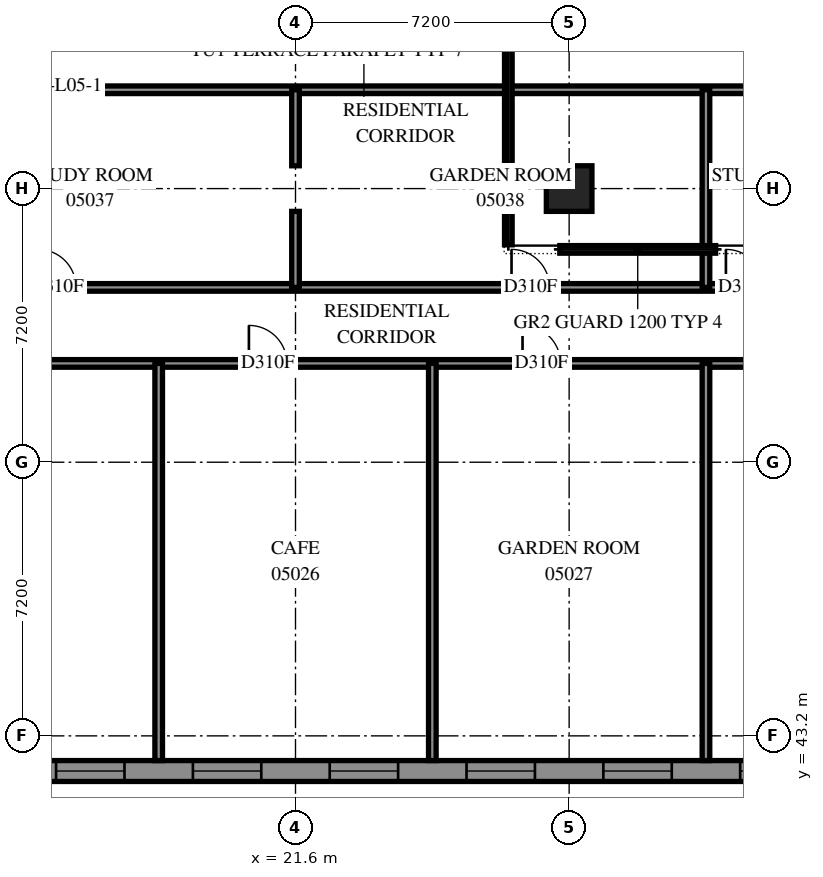
"""IFC4 building model, lengths in metres.
Left out: names, types, materials, properties, quantities, classifications, styles, units other than length and angle.
Written with IfcOpenShell. Run it as: python <this file> out.ifc"""

import sys

from ifc_helpers import new_model, si_unit, direction, frame, frame_2d, origin, origin_2d, place, context, subcontext, project, spatial, polyline, rectangle, outline, extrude, element, fill, save


model = new_model("IFC4")
c1 = context("Model", 3, precision=1e-05, world=origin(), true_north=direction((0.0, 1.0)))
c2 = subcontext(c1, "Body", "Model", "MODEL_VIEW")
j1 = project(units=[si_unit("LENGTHUNIT", "METRE"), si_unit("PLANEANGLEUNIT", "RADIAN")], contexts=[c1])
p1 = place(None, origin())
s1 = spatial("IfcSite", under=j1, at=p1, CompositionType="ELEMENT")
p2 = place(p1, origin())
s2 = spatial("IfcBuilding", under=s1, at=p2, CompositionType="ELEMENT")
p3 = place(p2, frame((0.0, 0.0, 22.8)))
s3 = spatial("IfcBuildingStorey", under=s2, at=p3, CompositionType="ELEMENT", Elevation=22.8)
p4 = place(p3, frame((28.8, 57.6, 0.0), z_axis=(0.0, 0.0, 1.0), x_axis=(1.0, 0.0, 0.0)))
e1 = element("IfcColumn", 1, at=p4, inside=s3, PredefinedType="COLUMN", context=c2, shape_type="SweptSolid", body=[
    extrude(rectangle(XDim=1.2, YDim=1.2, at=origin_2d()), origin(), (0.0, 0.0, 1.0), 3.9),
])
p5 = place(p3, frame((0.275, 42.275, 0.0), z_axis=(0.0, 0.0, 1.0), x_axis=(1.0, 0.0, 0.0)))
e2 = element("IfcWall", 2, at=p5, inside=s3, PredefinedType="SOLIDWALL", context=c2, shape_type="SweptSolid", body=[
    extrude(outline(polyline([(-0.275, -0.275), (76.681, -0.275), (76.909, 0.275), (0.275, 0.275), (-0.275, -0.275)])), origin(), (0.0, 0.0, 1.0), 3.9),
])
p6 = place(p5, frame((1.0, 0.0, 0.7)))
e3 = element("IfcOpeningElement", 3, at=p6, cuts=e2, PredefinedType="OPENING", context=c2, shape_type="SweptSolid", body=[
    extrude(rectangle(XDim=1.8, YDim=2.4, at=frame_2d((0.9, 1.2))), frame((0.0, 0.285, 0.0), z_axis=(0.0, -1.0, 0.0), x_axis=(1.0, 0.0, 0.0)), (0.0, 0.0, 1.0), 0.57),
])
p7 = place(p5, frame((3.825, 0.0, 0.7)))
e4 = element("IfcOpeningElement", 4, at=p7, cuts=e2, PredefinedType="OPENING", context=c2, shape_type="SweptSolid", body=[
    extrude(rectangle(XDim=1.8, YDim=2.4, at=frame_2d((0.9, 1.2))), frame((0.0, 0.285, 0.0), z_axis=(0.0, -1.0, 0.0), x_axis=(1.0, 0.0, 0.0)), (0.0, 0.0, 1.0), 0.57),
])
p8 = place(p5, frame((7.825, 0.0, 0.7)))
e5 = element("IfcOpeningElement", 5, at=p8, cuts=e2, PredefinedType="OPENING", context=c2, shape_type="SweptSolid", body=[
    extrude(rectangle(XDim=1.8, YDim=2.4, at=frame_2d((0.9, 1.2))), frame((0.0, 0.285, 0.0), z_axis=(0.0, -1.0, 0.0), x_axis=(1.0, 0.0, 0.0)), (0.0, 0.0, 1.0), 0.57),
])
p9 = place(p5, frame((11.425, 0.0, 0.7)))
e6 = element("IfcOpeningElement", 6, at=p9, cuts=e2, PredefinedType="OPENING", context=c2, shape_type="SweptSolid", body=[
    extrude(rectangle(XDim=1.8, YDim=2.4, at=frame_2d((0.9, 1.2))), frame((0.0, 0.285, 0.0), z_axis=(0.0, -1.0, 0.0), x_axis=(1.0, 0.0, 0.0)), (0.0, 0.0, 1.0), 0.57),
])
p10 = place(p5, frame((15.025, 0.0, 0.7)))
e7 = element("IfcOpeningElement", 7, at=p10, cuts=e2, PredefinedType="OPENING", context=c2, shape_type="SweptSolid", body=[
    extrude(rectangle(XDim=1.8, YDim=2.4, at=frame_2d((0.9, 1.2))), frame((0.0, 0.285, 0.0), z_axis=(0.0, -1.0, 0.0), x_axis=(1.0, 0.0, 0.0)), (0.0, 0.0, 1.0), 0.57),
])
p11 = place(p5, frame((18.625, 0.0, 0.7)))
e8 = element("IfcOpeningElement", 8, at=p11, cuts=e2, PredefinedType="OPENING", context=c2, shape_type="SweptSolid", body=[
    extrude(rectangle(XDim=1.8, YDim=2.4, at=frame_2d((0.9, 1.2))), frame((0.0, 0.285, 0.0), z_axis=(0.0, -1.0, 0.0), x_axis=(1.0, 0.0, 0.0)), (0.0, 0.0, 1.0), 0.57),
])
p12 = place(p5, frame((22.225, 0.0, 0.7)))
e9 = element("IfcOpeningElement", 9, at=p12, cuts=e2, PredefinedType="OPENING", context=c2, shape_type="SweptSolid", body=[
    extrude(rectangle(XDim=1.8, YDim=2.4, at=frame_2d((0.9, 1.2))), frame((0.0, 0.285, 0.0), z_axis=(0.0, -1.0, 0.0), x_axis=(1.0, 0.0, 0.0)), (0.0, 0.0, 1.0), 0.57),
])
p13 = place(p5, frame((25.825, 0.0, 0.7)))
e10 = element("IfcOpeningElement", 10, at=p13, cuts=e2, PredefinedType="OPENING", context=c2, shape_type="SweptSolid", body=[
    extrude(rectangle(XDim=1.8, YDim=2.4, at=frame_2d((0.9, 1.2))), frame((0.0, 0.285, 0.0), z_axis=(0.0, -1.0, 0.0), x_axis=(1.0, 0.0, 0.0)), (0.0, 0.0, 1.0), 0.57),
])
p14 = place(p5, frame((29.425, 0.0, 0.7)))
e11 = element("IfcOpeningElement", 11, at=p14, cuts=e2, PredefinedType="OPENING", context=c2, shape_type="SweptSolid", body=[
    extrude(rectangle(XDim=1.8, YDim=2.4, at=frame_2d((0.9, 1.2))), frame((0.0, 0.285, 0.0), z_axis=(0.0, -1.0, 0.0), x_axis=(1.0, 0.0, 0.0)), (0.0, 0.0, 1.0), 0.57),
])
p15 = place(p5, frame((33.025, 0.0, 0.7)))
e12 = element("IfcOpeningElement", 12, at=p15, cuts=e2, PredefinedType="OPENING", context=c2, shape_type="SweptSolid", body=[
    extrude(rectangle(XDim=1.8, YDim=2.4, at=frame_2d((0.9, 1.2))), frame((0.0, 0.285, 0.0), z_axis=(0.0, -1.0, 0.0), x_axis=(1.0, 0.0, 0.0)), (0.0, 0.0, 1.0), 0.57),
])
p16 = place(p5, frame((36.625, 0.0, 0.7)))
e13 = element("IfcOpeningElement", 13, at=p16, cuts=e2, PredefinedType="OPENING", context=c2, shape_type="SweptSolid", body=[
    extrude(rectangle(XDim=1.8, YDim=2.4, at=frame_2d((0.9, 1.2))), frame((0.0, 0.285, 0.0), z_axis=(0.0, -1.0, 0.0), x_axis=(1.0, 0.0, 0.0)), (0.0, 0.0, 1.0), 0.57),
])
p17 = place(p5, frame((40.225, 0.0, 0.7)))
e14 = element("IfcOpeningElement", 14, at=p17, cuts=e2, PredefinedType="OPENING", context=c2, shape_type="SweptSolid", body=[
    extrude(rectangle(XDim=1.8, YDim=2.4, at=frame_2d((0.9, 1.2))), frame((0.0, 0.285, 0.0), z_axis=(0.0, -1.0, 0.0), x_axis=(1.0, 0.0, 0.0)), (0.0, 0.0, 1.0), 0.57),
])
p18 = place(p5, frame((43.825, 0.0, 0.7)))
e15 = element("IfcOpeningElement", 15, at=p18, cuts=e2, PredefinedType="OPENING", context=c2, shape_type="SweptSolid", body=[
    extrude(rectangle(XDim=1.8, YDim=2.4, at=frame_2d((0.9, 1.2))), frame((0.0, 0.285, 0.0), z_axis=(0.0, -1.0, 0.0), x_axis=(1.0, 0.0, 0.0)), (0.0, 0.0, 1.0), 0.57),
])
p19 = place(p5, frame((47.425, 0.0, 0.7)))
e16 = element("IfcOpeningElement", 16, at=p19, cuts=e2, PredefinedType="OPENING", context=c2, shape_type="SweptSolid", body=[
    extrude(rectangle(XDim=1.8, YDim=2.4, at=frame_2d((0.9, 1.2))), frame((0.0, 0.285, 0.0), z_axis=(0.0, -1.0, 0.0), x_axis=(1.0, 0.0, 0.0)), (0.0, 0.0, 1.0), 0.57),
])
p20 = place(p5, frame((51.025, 0.0, 0.7)))
e17 = element("IfcOpeningElement", 17, at=p20, cuts=e2, PredefinedType="OPENING", context=c2, shape_type="SweptSolid", body=[
    extrude(rectangle(XDim=1.8, YDim=2.4, at=frame_2d((0.9, 1.2))), frame((0.0, 0.285, 0.0), z_axis=(0.0, -1.0, 0.0), x_axis=(1.0, 0.0, 0.0)), (0.0, 0.0, 1.0), 0.57),
])
p21 = place(p5, frame((54.625, 0.0, 0.7)))
e18 = element("IfcOpeningElement", 18, at=p21, cuts=e2, PredefinedType="OPENING", context=c2, shape_type="SweptSolid", body=[
    extrude(rectangle(XDim=1.8, YDim=2.4, at=frame_2d((0.9, 1.2))), frame((0.0, 0.285, 0.0), z_axis=(0.0, -1.0, 0.0), x_axis=(1.0, 0.0, 0.0)), (0.0, 0.0, 1.0), 0.57),
])
p22 = place(p5, frame((58.225, 0.0, 0.7)))
e19 = element("IfcOpeningElement", 19, at=p22, cuts=e2, PredefinedType="OPENING", context=c2, shape_type="SweptSolid", body=[
    extrude(rectangle(XDim=1.8, YDim=2.4, at=frame_2d((0.9, 1.2))), frame((0.0, 0.285, 0.0), z_axis=(0.0, -1.0, 0.0), x_axis=(1.0, 0.0, 0.0)), (0.0, 0.0, 1.0), 0.57),
])
p23 = place(p5, frame((61.825, 0.0, 0.7)))
e20 = element("IfcOpeningElement", 20, at=p23, cuts=e2, PredefinedType="OPENING", context=c2, shape_type="SweptSolid", body=[
    extrude(rectangle(XDim=1.8, YDim=2.4, at=frame_2d((0.9, 1.2))), frame((0.0, 0.285, 0.0), z_axis=(0.0, -1.0, 0.0), x_axis=(1.0, 0.0, 0.0)), (0.0, 0.0, 1.0), 0.57),
])
p24 = place(p5, frame((65.425, 0.0, 0.7)))
e21 = element("IfcOpeningElement", 21, at=p24, cuts=e2, PredefinedType="OPENING", context=c2, shape_type="SweptSolid", body=[
    extrude(rectangle(XDim=1.8, YDim=2.4, at=frame_2d((0.9, 1.2))), frame((0.0, 0.285, 0.0), z_axis=(0.0, -1.0, 0.0), x_axis=(1.0, 0.0, 0.0)), (0.0, 0.0, 1.0), 0.57),
])
p25 = place(p5, frame((69.025, 0.0, 0.7)))
e22 = element("IfcOpeningElement", 22, at=p25, cuts=e2, PredefinedType="OPENING", context=c2, shape_type="SweptSolid", body=[
    extrude(rectangle(XDim=1.8, YDim=2.4, at=frame_2d((0.9, 1.2))), frame((0.0, 0.285, 0.0), z_axis=(0.0, -1.0, 0.0), x_axis=(1.0, 0.0, 0.0)), (0.0, 0.0, 1.0), 0.57),
])
p26 = place(p5, frame((72.625, 0.0, 0.7)))
e23 = element("IfcOpeningElement", 23, at=p26, cuts=e2, PredefinedType="OPENING", context=c2, shape_type="SweptSolid", body=[
    extrude(rectangle(XDim=1.8, YDim=2.4, at=frame_2d((0.9, 1.2))), frame((0.0, 0.285, 0.0), z_axis=(0.0, -1.0, 0.0), x_axis=(1.0, 0.0, 0.0)), (0.0, 0.0, 1.0), 0.57),
])
p27 = place(p3, frame((0.0, 55.0, 0.0), z_axis=(0.0, 0.0, 1.0), x_axis=(1.0, 0.0, 0.0)))
e24 = element("IfcWall", 24, at=p27, inside=s3, PredefinedType="PARTITIONING", context=c2, shape_type="SweptSolid", body=[
    extrude(rectangle(XDim=54.6, YDim=0.2, at=frame_2d((27.3, 0.0))), origin(), (0.0, 0.0, 1.0), 3.9),
])
p28 = place(p27, frame((8.689, 0.0, 0.0)))
e25 = element("IfcOpeningElement", 25, at=p28, cuts=e24, PredefinedType="OPENING", context=c2, shape_type="SweptSolid", body=[
    extrude(rectangle(XDim=1.0, YDim=2.1, at=frame_2d((0.5, 1.05))), frame((0.0, 0.11, 0.0), z_axis=(0.0, -1.0, 0.0), x_axis=(1.0, 0.0, 0.0)), (0.0, 0.0, 1.0), 0.22),
])
p29 = place(p27, frame((14.825, 0.0, 0.0)))
e26 = element("IfcOpeningElement", 26, at=p29, cuts=e24, PredefinedType="OPENING", context=c2, shape_type="SweptSolid", body=[
    extrude(rectangle(XDim=1.0, YDim=2.1, at=frame_2d((0.5, 1.05))), frame((0.0, 0.11, 0.0), z_axis=(0.0, -1.0, 0.0), x_axis=(1.0, 0.0, 0.0)), (0.0, 0.0, 1.0), 0.22),
])
p30 = place(p27, frame((27.284, 0.0, 0.0)))
e27 = element("IfcOpeningElement", 27, at=p30, cuts=e24, PredefinedType="OPENING", context=c2, shape_type="SweptSolid", body=[
    extrude(rectangle(XDim=1.0, YDim=2.1, at=frame_2d((0.5, 1.05))), frame((0.0, 0.11, 0.0), z_axis=(0.0, -1.0, 0.0), x_axis=(1.0, 0.0, 0.0)), (0.0, 0.0, 1.0), 0.22),
])
p31 = place(p27, frame((32.925, 0.0, 0.0)))
e28 = element("IfcOpeningElement", 28, at=p31, cuts=e24, PredefinedType="OPENING", context=c2, shape_type="SweptSolid", body=[
    extrude(rectangle(XDim=1.0, YDim=2.1, at=frame_2d((0.5, 1.05))), frame((0.0, 0.11, 0.0), z_axis=(0.0, -1.0, 0.0), x_axis=(1.0, 0.0, 0.0)), (0.0, 0.0, 1.0), 0.22),
])
p32 = place(p27, frame((38.075, 0.0, 0.0)))
e29 = element("IfcOpeningElement", 29, at=p32, cuts=e24, PredefinedType="OPENING", context=c2, shape_type="SweptSolid", body=[
    extrude(rectangle(XDim=1.0, YDim=2.1, at=frame_2d((0.5, 1.05))), frame((0.0, 0.11, 0.0), z_axis=(0.0, -1.0, 0.0), x_axis=(1.0, 0.0, 0.0)), (0.0, 0.0, 1.0), 0.22),
])
p33 = place(p27, frame((43.625, 0.0, 0.0)))
e30 = element("IfcOpeningElement", 30, at=p33, cuts=e24, PredefinedType="OPENING", context=c2, shape_type="SweptSolid", body=[
    extrude(rectangle(XDim=1.0, YDim=2.1, at=frame_2d((0.5, 1.05))), frame((0.0, 0.11, 0.0), z_axis=(0.0, -1.0, 0.0), x_axis=(1.0, 0.0, 0.0)), (0.0, 0.0, 1.0), 0.22),
])
p34 = place(p27, frame((52.752, 0.0, 0.0)))
e31 = element("IfcOpeningElement", 31, at=p34, cuts=e24, PredefinedType="OPENING", context=c2, shape_type="SweptSolid", body=[
    extrude(rectangle(XDim=1.0, YDim=2.1, at=frame_2d((0.5, 1.05))), frame((0.0, 0.11, 0.0), z_axis=(0.0, -1.0, 0.0), x_axis=(1.0, 0.0, 0.0)), (0.0, 0.0, 1.0), 0.22),
])
p35 = place(p27, frame((2.332, 0.0, 0.0)))
e32 = element("IfcOpeningElement", 32, at=p35, cuts=e24, PredefinedType="OPENING", context=c2, shape_type="SweptSolid", body=[
    extrude(rectangle(XDim=1.0, YDim=2.1, at=frame_2d((0.5, 1.05))), frame((0.0, 0.11, 0.0), z_axis=(0.0, -1.0, 0.0), x_axis=(1.0, 0.0, 0.0)), (0.0, 0.0, 1.0), 0.22),
])
p36 = place(p3, frame((0.0, 53.0, 0.0), z_axis=(0.0, 0.0, 1.0), x_axis=(1.0, 0.0, 0.0)))
e33 = element("IfcWall", 33, at=p36, inside=s3, PredefinedType="PARTITIONING", context=c2, shape_type="SweptSolid", body=[
    extrude(rectangle(XDim=54.6, YDim=0.2, at=frame_2d((27.3, 0.0))), origin(), (0.0, 0.0, 1.0), 3.9),
])
p37 = place(p36, frame((8.689, 0.0, 0.0)))
e34 = element("IfcOpeningElement", 34, at=p37, cuts=e33, PredefinedType="OPENING", context=c2, shape_type="SweptSolid", body=[
    extrude(rectangle(XDim=1.0, YDim=2.1, at=frame_2d((0.5, 1.05))), frame((0.0, 0.11, 0.0), z_axis=(0.0, -1.0, 0.0), x_axis=(1.0, 0.0, 0.0)), (0.0, 0.0, 1.0), 0.22),
])
p38 = place(p36, frame((13.174, 0.0, 0.0)))
e35 = element("IfcOpeningElement", 35, at=p38, cuts=e33, PredefinedType="OPENING", context=c2, shape_type="SweptSolid", body=[
    extrude(rectangle(XDim=1.0, YDim=2.1, at=frame_2d((0.5, 1.05))), frame((0.0, 0.11, 0.0), z_axis=(0.0, -1.0, 0.0), x_axis=(1.0, 0.0, 0.0)), (0.0, 0.0, 1.0), 0.22),
])
p39 = place(p36, frame((20.374, 0.0, 0.0)))
e36 = element("IfcOpeningElement", 36, at=p39, cuts=e33, PredefinedType="OPENING", context=c2, shape_type="SweptSolid", body=[
    extrude(rectangle(XDim=1.0, YDim=2.1, at=frame_2d((0.5, 1.05))), frame((0.0, 0.11, 0.0), z_axis=(0.0, -1.0, 0.0), x_axis=(1.0, 0.0, 0.0)), (0.0, 0.0, 1.0), 0.22),
])
p40 = place(p36, frame((27.574, 0.0, 0.0)))
e37 = element("IfcOpeningElement", 37, at=p40, cuts=e33, PredefinedType="OPENING", context=c2, shape_type="SweptSolid", body=[
    extrude(rectangle(XDim=1.0, YDim=2.1, at=frame_2d((0.5, 1.05))), frame((0.0, 0.11, 0.0), z_axis=(0.0, -1.0, 0.0), x_axis=(1.0, 0.0, 0.0)), (0.0, 0.0, 1.0), 0.22),
])
p41 = place(p36, frame((34.774, 0.0, 0.0)))
e38 = element("IfcOpeningElement", 38, at=p41, cuts=e33, PredefinedType="OPENING", context=c2, shape_type="SweptSolid", body=[
    extrude(rectangle(XDim=1.0, YDim=2.1, at=frame_2d((0.5, 1.05))), frame((0.0, 0.11, 0.0), z_axis=(0.0, -1.0, 0.0), x_axis=(1.0, 0.0, 0.0)), (0.0, 0.0, 1.0), 0.22),
])
p42 = place(p36, frame((41.974, 0.0, 0.0)))
e39 = element("IfcOpeningElement", 39, at=p42, cuts=e33, PredefinedType="OPENING", context=c2, shape_type="SweptSolid", body=[
    extrude(rectangle(XDim=1.0, YDim=2.1, at=frame_2d((0.5, 1.05))), frame((0.0, 0.11, 0.0), z_axis=(0.0, -1.0, 0.0), x_axis=(1.0, 0.0, 0.0)), (0.0, 0.0, 1.0), 0.22),
])
p43 = place(p36, frame((49.174, 0.0, 0.0)))
e40 = element("IfcOpeningElement", 40, at=p43, cuts=e33, PredefinedType="OPENING", context=c2, shape_type="SweptSolid", body=[
    extrude(rectangle(XDim=1.0, YDim=2.1, at=frame_2d((0.5, 1.05))), frame((0.0, 0.11, 0.0), z_axis=(0.0, -1.0, 0.0), x_axis=(1.0, 0.0, 0.0)), (0.0, 0.0, 1.0), 0.22),
])
p44 = place(p36, frame((2.406, 0.0, 0.0)))
e41 = element("IfcOpeningElement", 41, at=p44, cuts=e33, PredefinedType="OPENING", context=c2, shape_type="SweptSolid", body=[
    extrude(rectangle(XDim=1.0, YDim=2.1, at=frame_2d((0.5, 1.05))), frame((0.0, 0.11, 0.0), z_axis=(0.0, -1.0, 0.0), x_axis=(1.0, 0.0, 0.0)), (0.0, 0.0, 1.0), 0.22),
])
p45 = place(p36, frame((4.748, 0.0, 0.0)))
e42 = element("IfcOpeningElement", 42, at=p45, cuts=e33, PredefinedType="OPENING", context=c2, shape_type="SweptSolid", body=[
    extrude(rectangle(XDim=1.0, YDim=2.1, at=frame_2d((0.5, 1.05))), frame((0.0, 0.11, 0.0), z_axis=(0.0, -1.0, 0.0), x_axis=(1.0, 0.0, 0.0)), (0.0, 0.0, 1.0), 0.22),
])
p46 = place(p3, frame((0.002, 60.2, 0.0), z_axis=(0.0, 0.0, 1.0), x_axis=(1.0, 0.0, 0.0)))
e43 = element("IfcWall", 43, at=p46, inside=s3, PredefinedType="PARTITIONING", context=c2, shape_type="SweptSolid", body=[
    extrude(rectangle(XDim=54.598, YDim=0.2, at=frame_2d((27.299, 0.0))), origin(), (0.0, 0.0, 1.0), 3.9),
])
p47 = place(p46, frame((3.863, 0.0, 0.0)))
e44 = element("IfcOpeningElement", 44, at=p47, cuts=e43, PredefinedType="OPENING", context=c2, shape_type="SweptSolid", body=[
    extrude(rectangle(XDim=1.0, YDim=2.1, at=frame_2d((0.5, 1.05))), frame((0.0, 0.11, 0.0), z_axis=(0.0, -1.0, 0.0), x_axis=(1.0, 0.0, 0.0)), (0.0, 0.0, 1.0), 0.22),
])
for number, where, z_axis, x_axis in (
    (45, (18.0, 42.55, 0.0), (0.0, 0.0, 1.0), (0.0, 1.0, 0.0)),
    (46, (25.2, 42.55, 0.0), (0.0, 0.0, 1.0), (0.0, 1.0, 0.0)),
    (47, (32.4, 42.55, 0.0), (0.0, 0.0, 1.0), (0.0, 1.0, 0.0)),
):
    element("IfcWall", number, at=place(p3, frame(where, z_axis=z_axis, x_axis=x_axis)), inside=s3, PredefinedType="PARTITIONING", context=c2, shape_type="SweptSolid", body=[
        extrude(rectangle(XDim=10.45, YDim=0.2, at=frame_2d((5.225, 0.0))), origin(), (0.0, 0.0, 1.0), 3.9),
    ])
p48 = place(p3, frame((32.4, 55.0, 0.0), z_axis=(0.0, 0.0, 1.0), x_axis=(0.0, 1.0, 0.0)))
e48 = element("IfcWall", 48, at=p48, inside=s3, PredefinedType="PARTITIONING", context=c2, shape_type="SweptSolid", body=[
    extrude(rectangle(XDim=5.2, YDim=0.2, at=frame_2d((2.6, 0.0))), origin(), (0.0, 0.0, 1.0), 3.9),
])
for number, where, z_axis, x_axis in (
    (49, (21.6, 55.0, 0.0), (0.0, 0.0, 1.0), (0.0, 1.0, 0.0)),
    (50, (21.6, 58.2, 0.0), (0.0, 0.0, 1.0), (0.0, 1.0, 0.0)),
):
    element("IfcWall", number, at=place(p3, frame(where, z_axis=z_axis, x_axis=x_axis)), inside=s3, PredefinedType="PARTITIONING", context=c2, shape_type="SweptSolid", body=[
        extrude(rectangle(XDim=2.0, YDim=0.2, at=frame_2d((1.0, 0.0))), origin(), (0.0, 0.0, 1.0), 3.9),
    ])
p49 = place(p3, frame((32.655, 56.0, 0.0), z_axis=(0.0, 0.0, 1.0), x_axis=(-1.0, 0.0, 0.0)))
e51 = element("IfcWall", 51, at=p49, inside=s3, PredefinedType="PARAPET", context=c2, shape_type="SweptSolid", body=[
    extrude(outline(polyline([(0.0, -0.1), (4.101, -0.1), (4.101, 0.1), (0.0, 0.1), (0.0, -0.1)])), origin(), (0.0, 0.0, 1.0), 0.25),
])
p50 = place(p3, frame((27.2, 56.12, 0.0), z_axis=(0.0, 0.0, 1.0), x_axis=(0.0, 1.0, 0.0)))
e52 = element("IfcWall", 52, at=p50, inside=s3, PredefinedType="PARAPET", context=c2, shape_type="SweptSolid", body=[
    extrude(outline(polyline([(0.0, -0.1), (7.18, -0.1), (6.98, 0.1), (0.0, 0.1), (0.0, -0.1)])), origin(), (0.0, 0.0, 1.0), 0.25),
])
p51 = place(p10, origin())
e53 = element("IfcWindow", 53, at=p51, inside=s3, PartitioningType="SINGLE_PANEL", PredefinedType="WINDOW", context=c2, shape_type="SweptSolid", body=[
    extrude(rectangle(XDim=1.8, YDim=2.4, at=frame_2d((0.9, 1.2))), frame((0.0, 0.155, 0.0), z_axis=(0.0, -1.0, 0.0), x_axis=(1.0, 0.0, 0.0)), (0.0, 0.0, 1.0), 0.06),
])
fill(e7, e53)
p52 = place(p11, origin())
e54 = element("IfcWindow", 54, at=p52, inside=s3, PartitioningType="SINGLE_PANEL", PredefinedType="WINDOW", context=c2, shape_type="SweptSolid", body=[
    extrude(rectangle(XDim=1.8, YDim=2.4, at=frame_2d((0.9, 1.2))), frame((0.0, 0.155, 0.0), z_axis=(0.0, -1.0, 0.0), x_axis=(1.0, 0.0, 0.0)), (0.0, 0.0, 1.0), 0.06),
])
fill(e8, e54)
p53 = place(p12, origin())
e55 = element("IfcWindow", 55, at=p53, inside=s3, PartitioningType="SINGLE_PANEL", PredefinedType="WINDOW", context=c2, shape_type="SweptSolid", body=[
    extrude(rectangle(XDim=1.8, YDim=2.4, at=frame_2d((0.9, 1.2))), frame((0.0, 0.155, 0.0), z_axis=(0.0, -1.0, 0.0), x_axis=(1.0, 0.0, 0.0)), (0.0, 0.0, 1.0), 0.06),
])
fill(e9, e55)
p54 = place(p13, origin())
e56 = element("IfcWindow", 56, at=p54, inside=s3, PartitioningType="SINGLE_PANEL", PredefinedType="WINDOW", context=c2, shape_type="SweptSolid", body=[
    extrude(rectangle(XDim=1.8, YDim=2.4, at=frame_2d((0.9, 1.2))), frame((0.0, 0.155, 0.0), z_axis=(0.0, -1.0, 0.0), x_axis=(1.0, 0.0, 0.0)), (0.0, 0.0, 1.0), 0.06),
])
fill(e10, e56)
p55 = place(p14, origin())
e57 = element("IfcWindow", 57, at=p55, inside=s3, PartitioningType="SINGLE_PANEL", PredefinedType="WINDOW", context=c2, shape_type="SweptSolid", body=[
    extrude(rectangle(XDim=1.8, YDim=2.4, at=frame_2d((0.9, 1.2))), frame((0.0, 0.155, 0.0), z_axis=(0.0, -1.0, 0.0), x_axis=(1.0, 0.0, 0.0)), (0.0, 0.0, 1.0), 0.06),
])
fill(e11, e57)
p56 = place(p15, origin())
e58 = element("IfcWindow", 58, at=p56, inside=s3, PartitioningType="SINGLE_PANEL", PredefinedType="WINDOW", context=c2, shape_type="SweptSolid", body=[
    extrude(rectangle(XDim=1.8, YDim=2.4, at=frame_2d((0.9, 1.2))), frame((0.0, 0.155, 0.0), z_axis=(0.0, -1.0, 0.0), x_axis=(1.0, 0.0, 0.0)), (0.0, 0.0, 1.0), 0.06),
])
fill(e12, e58)
p57 = place(p39, origin())
e59 = element("IfcDoor", 59, at=p57, inside=s3, OperationType="SINGLE_SWING_RIGHT", PredefinedType="DOOR", context=c2, shape_type="SweptSolid", body=[
    extrude(rectangle(XDim=1.0, YDim=2.1, at=frame_2d((0.5, 1.05))), frame((0.0, 0.025, 0.0), z_axis=(0.0, -1.0, 0.0), x_axis=(1.0, 0.0, 0.0)), (0.0, 0.0, 1.0), 0.05),
])
fill(e36, e59)
p58 = place(p40, origin())
e60 = element("IfcDoor", 60, at=p58, inside=s3, OperationType="SINGLE_SWING_RIGHT", PredefinedType="DOOR", context=c2, shape_type="SweptSolid", body=[
    extrude(rectangle(XDim=1.0, YDim=2.1, at=frame_2d((0.5, 1.05))), frame((0.0, 0.025, 0.0), z_axis=(0.0, -1.0, 0.0), x_axis=(1.0, 0.0, 0.0)), (0.0, 0.0, 1.0), 0.05),
])
fill(e37, e60)
p59 = place(p29, origin())
e61 = element("IfcDoor", 61, at=p59, inside=s3, OperationType="SINGLE_SWING_LEFT", PredefinedType="DOOR", context=c2, shape_type="SweptSolid", body=[
    extrude(rectangle(XDim=1.0, YDim=2.1, at=frame_2d((0.5, 1.05))), frame((0.0, 0.025, 0.0), z_axis=(0.0, -1.0, 0.0), x_axis=(1.0, 0.0, 0.0)), (0.0, 0.0, 1.0), 0.05),
])
fill(e26, e61)
p60 = place(p30, origin())
e62 = element("IfcDoor", 62, at=p60, inside=s3, OperationType="SINGLE_SWING_RIGHT", PredefinedType="DOOR", context=c2, shape_type="SweptSolid", body=[
    extrude(rectangle(XDim=1.0, YDim=2.1, at=frame_2d((0.5, 1.05))), frame((0.0, 0.025, 0.0), z_axis=(0.0, -1.0, 0.0), x_axis=(1.0, 0.0, 0.0)), (0.0, 0.0, 1.0), 0.05),
])
fill(e27, e62)
p61 = place(p31, origin())
e63 = element("IfcDoor", 63, at=p61, inside=s3, OperationType="SINGLE_SWING_LEFT", PredefinedType="DOOR", context=c2, shape_type="SweptSolid", body=[
    extrude(rectangle(XDim=1.0, YDim=2.1, at=frame_2d((0.5, 1.05))), frame((0.0, 0.025, 0.0), z_axis=(0.0, -1.0, 0.0), x_axis=(1.0, 0.0, 0.0)), (0.0, 0.0, 1.0), 0.05),
])
fill(e28, e63)
save(model, sys.argv[1])
